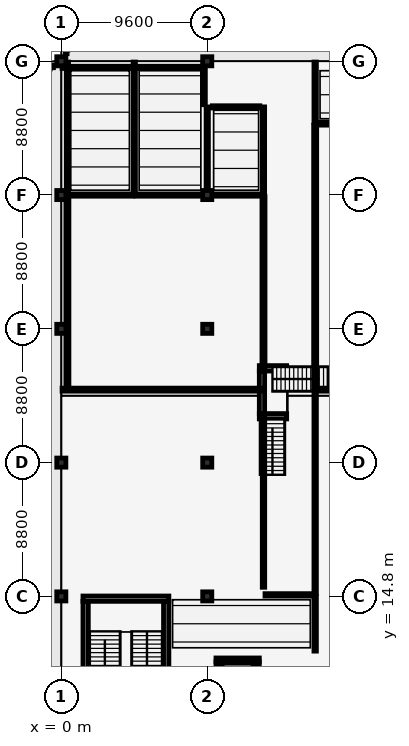
"""IFC4 building model, lengths in metres.
Left out: names, types, materials, properties, quantities, classifications, styles, units other than length and angle.
Written with IfcOpenShell. Run it as: python <this file> out.ifc"""

import sys

from ifc_helpers import new_model, si_unit, direction, frame, frame_2d, origin, origin_2d, place, context, subcontext, project, spatial, rectangle, extrude, element, fill, save


model = new_model("IFC4")
c1 = context("Model", 3, precision=1e-05, world=origin(), true_north=direction((0.0, 1.0)))
c2 = subcontext(c1, "Body", "Model", "MODEL_VIEW")
j1 = project(units=[si_unit("LENGTHUNIT", "METRE"), si_unit("PLANEANGLEUNIT", "RADIAN")], contexts=[c1])
p1 = place(None, origin())
s1 = spatial("IfcSite", under=j1, at=p1, CompositionType="ELEMENT")
p2 = place(p1, origin())
s2 = spatial("IfcBuilding", under=s1, at=p2, CompositionType="ELEMENT")
p3 = place(p2, origin())
s3 = spatial("IfcBuildingStorey", under=s2, at=p3, CompositionType="ELEMENT", Elevation=0.0)
for number, where, z_axis, x_axis in (
    (1, (0.0, 14.8, 0.0), (0.0, 0.0, 1.0), (1.0, 0.0, 0.0)),
    (2, (0.0, 23.6, 0.0), (0.0, 0.0, 1.0), (1.0, 0.0, 0.0)),
    (3, (0.0, 32.4, 0.0), (0.0, 0.0, 1.0), (1.0, 0.0, 0.0)),
    (4, (0.0, 41.2, 0.0), (0.0, 0.0, 1.0), (1.0, 0.0, 0.0)),
    (5, (0.0, 50.0, 0.0), (0.0, 0.0, 1.0), (1.0, 0.0, 0.0)),
    (6, (9.6, 14.8, 0.0), (0.0, 0.0, 1.0), (1.0, 0.0, 0.0)),
    (7, (9.6, 23.6, 0.0), (0.0, 0.0, 1.0), (1.0, 0.0, 0.0)),
    (8, (9.6, 32.4, 0.0), (0.0, 0.0, 1.0), (1.0, 0.0, 0.0)),
    (9, (9.6, 41.2, 0.0), (0.0, 0.0, 1.0), (1.0, 0.0, 0.0)),
    (10, (9.6, 50.0, 0.0), (0.0, 0.0, 1.0), (1.0, 0.0, 0.0)),
):
    element("IfcColumn", number, at=place(p3, frame(where, z_axis=z_axis, x_axis=x_axis)), inside=s3, PredefinedType="COLUMN", context=c2, shape_type="SweptSolid", body=[
        extrude(rectangle(XDim=0.6, YDim=0.6, at=origin_2d()), origin(), (0.0, 0.0, 1.0), 4.8),
    ])
p4 = place(p3, frame((1.425, 14.65, 0.0), z_axis=(0.0, 0.0, 1.0), x_axis=(1.0, 0.0, 0.0)))
e11 = element("IfcWall", 11, at=p4, inside=s3, PredefinedType="SHEAR", context=c2, shape_type="SweptSolid", body=[
    extrude(rectangle(XDim=5.65, YDim=0.35, at=frame_2d((2.825, 0.0))), origin(), (0.0, 0.0, 1.0), 4.55),
])
p5 = place(p3, frame((1.6, 6.525, 0.0), z_axis=(0.0, 0.0, 1.0), x_axis=(0.0, 1.0, 0.0)))
e12 = element("IfcWall", 12, at=p5, inside=s3, PredefinedType="SHEAR", context=c2, shape_type="SweptSolid", body=[
    extrude(rectangle(XDim=7.95, YDim=0.35, at=frame_2d((3.975, 0.0))), origin(), (0.0, 0.0, 1.0), 4.55),
])
p6 = place(p3, frame((6.9, 14.475, 0.0), z_axis=(0.0, 0.0, 1.0), x_axis=(0.0, -1.0, 0.0)))
e13 = element("IfcWall", 13, at=p6, inside=s3, PredefinedType="SHEAR", context=c2, shape_type="SweptSolid", body=[
    extrude(rectangle(XDim=7.95, YDim=0.35, at=frame_2d((3.975, 0.0))), origin(), (0.0, 0.0, 1.0), 4.55),
])
p7 = place(p6, frame((0.35, 0.0, 0.0)))
e14 = element("IfcOpeningElement", 14, at=p7, cuts=e13, PredefinedType="OPENING", context=c2, shape_type="SweptSolid", body=[
    extrude(rectangle(XDim=2.05, YDim=2.15, at=frame_2d((1.025, 1.075))), frame((0.0, 0.185, 0.0), z_axis=(0.0, -1.0, 0.0), x_axis=(1.0, 0.0, 0.0)), (0.0, 0.0, 1.0), 0.37),
])
for number, where, z_axis, x_axis in (
    (15, (13.025, 26.65, 0.0), (0.0, 0.0, 1.0), (1.0, 0.0, 0.0)),
    (16, (13.025, 29.8, 0.0), (0.0, 0.0, 1.0), (1.0, 0.0, 0.0)),
):
    element("IfcWall", number, at=place(p3, frame(where, z_axis=z_axis, x_axis=x_axis)), inside=s3, PredefinedType="SHEAR", context=c2, shape_type="SweptSolid", body=[
        extrude(rectangle(XDim=1.8, YDim=0.35, at=frame_2d((0.9, 0.0))), origin(), (0.0, 0.0, 1.0), 2.205),
    ])
p8 = place(p3, frame((13.2, 26.825, 0.0), z_axis=(0.0, 0.0, 1.0), x_axis=(0.0, 1.0, 0.0)))
e17 = element("IfcWall", 17, at=p8, inside=s3, PredefinedType="SHEAR", context=c2, shape_type="SweptSolid", body=[
    extrude(rectangle(XDim=2.8, YDim=0.35, at=frame_2d((1.4, 0.0))), origin(), (0.0, 0.0, 1.0), 2.205),
])
p9 = place(p3, frame((10.175, 10.625, -1.5), z_axis=(0.0, 0.0, 1.0), x_axis=(1.0, 0.0, 0.0)))
e18 = element("IfcWall", 18, at=p9, inside=s3, PredefinedType="SOLIDWALL", context=c2, shape_type="SweptSolid", body=[
    extrude(rectangle(XDim=2.85, YDim=0.25, at=frame_2d((1.425, 0.0))), origin(), (0.0, 0.0, 1.0), 6.05),
])
p10 = place(p9, frame((0.875, 0.0, 1.5)))
e19 = element("IfcOpeningElement", 19, at=p10, cuts=e18, PredefinedType="OPENING", context=c2, shape_type="SweptSolid", body=[
    extrude(rectangle(XDim=1.1, YDim=2.15, at=frame_2d((0.55, 1.075))), frame((0.0, 0.135, 0.0), z_axis=(0.0, -1.0, 0.0), x_axis=(1.0, 0.0, 0.0)), (0.0, 0.0, 1.0), 0.27),
])
for number, where, z_axis, x_axis in (
    (20, (10.3, 8.7, -1.5), (0.0, 0.0, 1.0), (0.0, 1.0, 0.0)),
    (21, (12.9, 10.5, -1.5), (0.0, 0.0, 1.0), (0.0, -1.0, 0.0)),
):
    element("IfcWall", number, at=place(p3, frame(where, z_axis=z_axis, x_axis=x_axis)), inside=s3, PredefinedType="SOLIDWALL", context=c2, shape_type="SweptSolid", body=[
        extrude(rectangle(XDim=1.8, YDim=0.25, at=frame_2d((0.9, 0.0))), origin(), (0.0, 0.0, 1.0), 6.05),
    ])
p11 = place(p3, frame((16.8, 28.4, 0.0), z_axis=(0.0, 0.0, 1.0), x_axis=(1.0, 0.0, 0.0)))
e22 = element("IfcWall", 22, at=p11, inside=s3, PredefinedType="PARTITIONING", context=c2, shape_type="SweptSolid", body=[
    extrude(rectangle(XDim=14.2, YDim=0.2, at=frame_2d((7.1, 0.0))), origin(), (0.0, 0.0, 1.0), 4.42),
])
p12 = place(p3, frame((16.7, 11.2, 0.0), z_axis=(0.0, 0.0, 1.0), x_axis=(0.0, 1.0, 0.0)))
e23 = element("IfcWall", 23, at=p12, inside=s3, PredefinedType="PARTITIONING", context=c2, shape_type="SweptSolid", body=[
    extrude(rectangle(XDim=3.6, YDim=0.16, at=frame_2d((1.8, 0.0))), origin(), (0.0, 0.0, 1.0), 4.42),
])
p13 = place(p12, frame((0.9, 0.0, 0.0)))
e24 = element("IfcOpeningElement", 24, at=p13, cuts=e23, PredefinedType="OPENING", context=c2, shape_type="SweptSolid", body=[
    extrude(rectangle(XDim=1.8, YDim=2.15, at=frame_2d((0.9, 1.075))), frame((0.0, 0.09, 0.0), z_axis=(0.0, -1.0, 0.0), x_axis=(1.0, 0.0, 0.0)), (0.0, 0.0, 1.0), 0.18),
])
p14 = place(p3, frame((16.7, 15.0, 0.0), z_axis=(0.0, 0.0, 1.0), x_axis=(0.0, 1.0, 0.0)))
e25 = element("IfcWall", 25, at=p14, inside=s3, PredefinedType="PARTITIONING", context=c2, shape_type="SweptSolid", body=[
    extrude(rectangle(XDim=13.3, YDim=0.16, at=frame_2d((6.65, 0.0))), origin(), (0.0, 0.0, 1.0), 4.42),
])
p15 = place(p14, frame((5.75, 0.0, 0.0)))
e26 = element("IfcOpeningElement", 26, at=p15, cuts=e25, PredefinedType="OPENING", context=c2, shape_type="SweptSolid", body=[
    extrude(rectangle(XDim=1.8, YDim=2.15, at=frame_2d((0.9, 1.075))), frame((0.0, 0.09, 0.0), z_axis=(0.0, -1.0, 0.0), x_axis=(1.0, 0.0, 0.0)), (0.0, 0.0, 1.0), 0.18),
])
p16 = place(p3, frame((0.05, 28.4, 0.0), z_axis=(0.0, 0.0, 1.0), x_axis=(1.0, 0.0, 0.0)))
e27 = element("IfcWall", 27, at=p16, inside=s3, PredefinedType="PARTITIONING", context=c2, shape_type="SweptSolid", body=[
    extrude(rectangle(XDim=13.15, YDim=0.2, at=frame_2d((6.575, 0.0))), origin(), (0.0, 0.0, 1.0), 4.42),
])
p17 = place(p3, frame((13.3, 15.4, 0.0), z_axis=(0.0, 0.0, 1.0), x_axis=(0.0, 1.0, 0.0)))
e28 = element("IfcWall", 28, at=p17, inside=s3, PredefinedType="PARTITIONING", context=c2, shape_type="SweptSolid", body=[
    extrude(rectangle(XDim=11.345, YDim=0.16, at=frame_2d((5.673, 0.0))), origin(), (0.0, 0.0, 1.0), 4.42),
])
p18 = place(p17, frame((4.772, 0.0, 0.0)))
e29 = element("IfcOpeningElement", 29, at=p18, cuts=e28, PredefinedType="OPENING", context=c2, shape_type="SweptSolid", body=[
    extrude(rectangle(XDim=1.8, YDim=2.15, at=frame_2d((0.9, 1.075))), frame((0.0, 0.09, 0.0), z_axis=(0.0, -1.0, 0.0), x_axis=(1.0, 0.0, 0.0)), (0.0, 0.0, 1.0), 0.18),
])
p19 = place(p3, frame((13.3, 29.705, 0.0), z_axis=(0.0, 0.0, 1.0), x_axis=(0.0, 1.0, 0.0)))
e30 = element("IfcWall", 30, at=p19, inside=s3, PredefinedType="PARTITIONING", context=c2, shape_type="SweptSolid", body=[
    extrude(rectangle(XDim=11.395, YDim=0.2, at=frame_2d((5.698, 0.0))), origin(), (0.0, 0.0, 1.0), 4.42),
])
p20 = place(p19, frame((4.898, 0.0, 0.0)))
e31 = element("IfcOpeningElement", 31, at=p20, cuts=e30, PredefinedType="OPENING", context=c2, shape_type="SweptSolid", body=[
    extrude(rectangle(XDim=1.6, YDim=2.15, at=frame_2d((0.8, 1.075))), frame((0.0, 0.11, 0.0), z_axis=(0.0, -1.0, 0.0), x_axis=(1.0, 0.0, 0.0)), (0.0, 0.0, 1.0), 0.22),
])
p21 = place(p3, frame((0.05, 41.2, 0.0), z_axis=(0.0, 0.0, 1.0), x_axis=(1.0, 0.0, 0.0)))
e32 = element("IfcWall", 32, at=p21, inside=s3, PredefinedType="PARTITIONING", context=c2, shape_type="SweptSolid", body=[
    extrude(rectangle(XDim=4.65, YDim=0.15, at=frame_2d((2.325, 0.0))), origin(), (0.0, 0.0, 1.0), 3.895),
])
p22 = place(p3, frame((4.9, 41.2, 0.0), z_axis=(0.0, 0.0, 1.0), x_axis=(1.0, 0.0, 0.0)))
e33 = element("IfcWall", 33, at=p22, inside=s3, PredefinedType="PARTITIONING", context=c2, shape_type="SweptSolid", body=[
    extrude(rectangle(XDim=4.5, YDim=0.15, at=frame_2d((2.25, 0.0))), origin(), (0.0, 0.0, 1.0), 3.895),
])
p23 = place(p3, frame((9.8, 41.2, 0.0), z_axis=(0.0, 0.0, 1.0), x_axis=(1.0, 0.0, 0.0)))
e34 = element("IfcWall", 34, at=p23, inside=s3, PredefinedType="PARTITIONING", context=c2, shape_type="SweptSolid", body=[
    extrude(rectangle(XDim=3.4, YDim=0.15, at=frame_2d((1.7, 0.0))), origin(), (0.0, 0.0, 1.0), 3.895),
])
p24 = place(p3, frame((16.7, 28.5, 0.0), z_axis=(0.0, 0.0, 1.0), x_axis=(0.0, 1.0, 0.0)))
e35 = element("IfcWall", 35, at=p24, inside=s3, PredefinedType="PARTITIONING", context=c2, shape_type="SweptSolid", body=[
    extrude(rectangle(XDim=17.3, YDim=0.2, at=frame_2d((8.65, 0.0))), origin(), (0.0, 0.0, 1.0), 4.42),
])
p25 = place(p24, frame((7.85, 0.0, 0.0)))
e36 = element("IfcOpeningElement", 36, at=p25, cuts=e35, PredefinedType="OPENING", context=c2, shape_type="SweptSolid", body=[
    extrude(rectangle(XDim=1.6, YDim=2.15, at=frame_2d((0.8, 1.075))), frame((0.0, 0.11, 0.0), z_axis=(0.0, -1.0, 0.0), x_axis=(1.0, 0.0, 0.0)), (0.0, 0.0, 1.0), 0.22),
])
p26 = place(p3, frame((16.8, 45.9, 0.0), z_axis=(0.0, 0.0, 1.0), x_axis=(1.0, 0.0, 0.0)))
e37 = element("IfcWall", 37, at=p26, inside=s3, PredefinedType="PARTITIONING", context=c2, shape_type="SweptSolid", body=[
    extrude(rectangle(XDim=14.2, YDim=0.2, at=frame_2d((7.1, 0.0))), origin(), (0.0, 0.0, 1.0), 4.42),
])
p27 = place(p26, frame((6.3, 0.0, 0.0)))
e38 = element("IfcOpeningElement", 38, at=p27, cuts=e37, PredefinedType="OPENING", context=c2, shape_type="SweptSolid", body=[
    extrude(rectangle(XDim=1.6, YDim=2.15, at=frame_2d((0.8, 1.075))), frame((0.0, 0.11, 0.0), z_axis=(0.0, -1.0, 0.0), x_axis=(1.0, 0.0, 0.0)), (0.0, 0.0, 1.0), 0.22),
])
p28 = place(p3, frame((13.4, 14.9, 0.0), z_axis=(0.0, 0.0, 1.0), x_axis=(1.0, 0.0, 0.0)))
e39 = element("IfcWall", 39, at=p28, inside=s3, PredefinedType="PARTITIONING", context=c2, shape_type="SweptSolid", body=[
    extrude(rectangle(XDim=3.2, YDim=0.16, at=frame_2d((1.6, 0.0))), origin(), (0.0, 0.0, 1.0), 3.895),
])
p29 = place(p28, frame((0.7, 0.0, 0.0)))
e40 = element("IfcOpeningElement", 40, at=p29, cuts=e39, PredefinedType="OPENING", context=c2, shape_type="SweptSolid", body=[
    extrude(rectangle(XDim=1.8, YDim=2.15, at=frame_2d((0.9, 1.075))), frame((0.0, 0.09, 0.0), z_axis=(0.0, -1.0, 0.0), x_axis=(1.0, 0.0, 0.0)), (0.0, 0.0, 1.0), 0.18),
])
p30 = place(p3, frame((16.7, 46.0, 0.0), z_axis=(0.0, 0.0, 1.0), x_axis=(0.0, 1.0, 0.0)))
e41 = element("IfcWall", 41, at=p30, inside=s3, PredefinedType="PARTITIONING", context=c2, shape_type="SweptSolid", body=[
    extrude(rectangle(XDim=3.95, YDim=0.16, at=frame_2d((1.975, 0.0))), origin(), (0.0, 0.0, 1.0), 4.42),
])
p31 = place(p30, frame((1.075, 0.0, 0.0)))
e42 = element("IfcOpeningElement", 42, at=p31, cuts=e41, PredefinedType="OPENING", context=c2, shape_type="SweptSolid", body=[
    extrude(rectangle(XDim=1.8, YDim=2.15, at=frame_2d((0.9, 1.075))), frame((0.0, 0.09, 0.0), z_axis=(0.0, -1.0, 0.0), x_axis=(1.0, 0.0, 0.0)), (0.0, 0.0, 1.0), 0.18),
])
p32 = place(p3, frame((13.3, 41.3, 0.0), z_axis=(0.0, 0.0, 1.0), x_axis=(0.0, 1.0, 0.0)))
e43 = element("IfcWall", 43, at=p32, inside=s3, PredefinedType="PARTITIONING", context=c2, shape_type="SweptSolid", body=[
    extrude(rectangle(XDim=5.7, YDim=0.15, at=frame_2d((2.85, 0.0))), origin(), (0.0, 0.0, 1.0), 4.42),
])
p33 = place(p32, frame((2.375, 0.0, 0.0)))
e44 = element("IfcOpeningElement", 44, at=p33, cuts=e43, PredefinedType="OPENING", context=c2, shape_type="SweptSolid", body=[
    extrude(rectangle(XDim=0.95, YDim=2.15, at=frame_2d((0.475, 1.075))), frame((0.0, 0.085, 0.0), z_axis=(0.0, -1.0, 0.0), x_axis=(1.0, 0.0, 0.0)), (0.0, 0.0, 1.0), 0.17),
])
p34 = place(p3, frame((4.8, 41.3, 0.0), z_axis=(0.0, 0.0, 1.0), x_axis=(0.0, 1.0, 0.0)))
e45 = element("IfcWall", 45, at=p34, inside=s3, PredefinedType="PARTITIONING", context=c2, shape_type="SweptSolid", body=[
    extrude(rectangle(XDim=8.65, YDim=0.15, at=frame_2d((4.325, 0.0))), origin(), (0.0, 0.0, 1.0), 4.42),
])
p35 = place(p3, frame((9.6, 41.3, 0.0), z_axis=(0.0, 0.0, 1.0), x_axis=(0.0, 1.0, 0.0)))
e46 = element("IfcWall", 46, at=p35, inside=s3, PredefinedType="PARTITIONING", context=c2, shape_type="SweptSolid", body=[
    extrude(rectangle(XDim=5.7, YDim=0.15, at=frame_2d((2.85, 0.0))), origin(), (0.0, 0.0, 1.0), 4.037),
])
p36 = place(p3, frame((0.4, 28.64, 0.0), z_axis=(0.0, 0.0, 1.0), x_axis=(0.0, 1.0, 0.0)))
e47 = element("IfcWall", 47, at=p36, inside=s3, PredefinedType="PARTITIONING", context=c2, shape_type="SweptSolid", body=[
    extrude(rectangle(XDim=12.32, YDim=0.2, at=frame_2d((6.16, 0.0))), origin(), (0.0, 0.0, 1.0), 4.42),
])
p37 = place(p3, frame((0.05, 49.6, 0.0), z_axis=(0.0, 0.0, 1.0), x_axis=(1.0, 0.0, 0.0)))
e48 = element("IfcWall", 48, at=p37, inside=s3, PredefinedType="PARTITIONING", context=c2, shape_type="SweptSolid", body=[
    extrude(rectangle(XDim=4.51, YDim=0.15, at=frame_2d((2.255, 0.0))), origin(), (0.0, 0.0, 1.0), 4.42),
])
p38 = place(p37, frame((1.805, 0.0, 0.0)))
e49 = element("IfcOpeningElement", 49, at=p38, cuts=e48, PredefinedType="OPENING", context=c2, shape_type="SweptSolid", body=[
    extrude(rectangle(XDim=0.9, YDim=2.15, at=frame_2d((0.45, 1.075))), frame((0.0, 0.085, 0.0), z_axis=(0.0, -1.0, 0.0), x_axis=(1.0, 0.0, 0.0)), (0.0, 0.0, 1.0), 0.17),
])
p39 = place(p3, frame((0.4, 41.44, 0.0), z_axis=(0.0, 0.0, 1.0), x_axis=(0.0, 1.0, 0.0)))
e50 = element("IfcWall", 50, at=p39, inside=s3, PredefinedType="PARTITIONING", context=c2, shape_type="SweptSolid", body=[
    extrude(rectangle(XDim=8.51, YDim=0.15, at=frame_2d((4.255, 0.0))), origin(), (0.0, 0.0, 1.0), 4.42),
])
p40 = place(p3, frame((5.04, 49.6, 0.0), z_axis=(0.0, 0.0, 1.0), x_axis=(1.0, 0.0, 0.0)))
e51 = element("IfcWall", 51, at=p40, inside=s3, PredefinedType="PARTITIONING", context=c2, shape_type="SweptSolid", body=[
    extrude(rectangle(XDim=4.22, YDim=0.15, at=frame_2d((2.11, 0.0))), origin(), (0.0, 0.0, 1.0), 4.42),
])
p41 = place(p40, frame((1.66, 0.0, 0.0)))
e52 = element("IfcOpeningElement", 52, at=p41, cuts=e51, PredefinedType="OPENING", context=c2, shape_type="SweptSolid", body=[
    extrude(rectangle(XDim=0.9, YDim=2.15, at=frame_2d((0.45, 1.075))), frame((0.0, 0.085, 0.0), z_axis=(0.0, -1.0, 0.0), x_axis=(1.0, 0.0, 0.0)), (0.0, 0.0, 1.0), 0.17),
])
p42 = place(p3, frame((9.4, 47.14, 0.0), z_axis=(0.0, 0.0, 1.0), x_axis=(0.0, 1.0, 0.0)))
e53 = element("IfcWall", 53, at=p42, inside=s3, PredefinedType="PARTITIONING", context=c2, shape_type="SweptSolid", body=[
    extrude(rectangle(XDim=2.81, YDim=0.15, at=frame_2d((1.405, 0.0))), origin(), (0.0, 0.0, 1.0), 4.037),
])
p43 = place(p3, frame((9.94, 47.0, 0.0), z_axis=(0.0, 0.0, 1.0), x_axis=(1.0, 0.0, 0.0)))
e54 = element("IfcWall", 54, at=p43, inside=s3, PredefinedType="PARTITIONING", context=c2, shape_type="SweptSolid", body=[
    extrude(rectangle(XDim=3.12, YDim=0.15, at=frame_2d((1.56, 0.0))), origin(), (0.0, 0.0, 1.0), 4.1),
])
p44 = place(p7, origin())
e55 = element("IfcDoor", 55, at=p44, inside=s3, OperationType="DOUBLE_DOOR_SINGLE_SWING", PredefinedType="DOOR", context=c2, shape_type="SweptSolid", body=[
    extrude(rectangle(XDim=2.05, YDim=2.15, at=frame_2d((1.025, 1.075))), frame((0.0, 0.025, 0.0), z_axis=(0.0, -1.0, 0.0), x_axis=(1.0, 0.0, 0.0)), (0.0, 0.0, 1.0), 0.05),
])
fill(e14, e55)
p45 = place(p10, origin())
e56 = element("IfcDoor", 56, at=p45, inside=s3, OperationType="DOUBLE_DOOR_SLIDING", PredefinedType="DOOR", context=c2, shape_type="SweptSolid", body=[
    extrude(rectangle(XDim=1.1, YDim=2.15, at=frame_2d((0.55, 1.075))), frame((0.0, 0.025, 0.0), z_axis=(0.0, -1.0, 0.0), x_axis=(1.0, 0.0, 0.0)), (0.0, 0.0, 1.0), 0.05),
])
fill(e19, e56)
p46 = place(p13, origin())
e57 = element("IfcDoor", 57, at=p46, inside=s3, OperationType="DOUBLE_DOOR_SINGLE_SWING", PredefinedType="DOOR", context=c2, shape_type="SweptSolid", body=[
    extrude(rectangle(XDim=1.8, YDim=2.15, at=frame_2d((0.9, 1.075))), frame((0.0, 0.025, 0.0), z_axis=(0.0, -1.0, 0.0), x_axis=(1.0, 0.0, 0.0)), (0.0, 0.0, 1.0), 0.05),
])
fill(e24, e57)
p47 = place(p15, origin())
e58 = element("IfcDoor", 58, at=p47, inside=s3, OperationType="DOUBLE_DOOR_SINGLE_SWING", PredefinedType="DOOR", context=c2, shape_type="SweptSolid", body=[
    extrude(rectangle(XDim=1.8, YDim=2.15, at=frame_2d((0.9, 1.075))), frame((0.0, 0.025, 0.0), z_axis=(0.0, -1.0, 0.0), x_axis=(1.0, 0.0, 0.0)), (0.0, 0.0, 1.0), 0.05),
])
fill(e26, e58)
p48 = place(p18, origin())
e59 = element("IfcDoor", 59, at=p48, inside=s3, OperationType="DOUBLE_DOOR_SINGLE_SWING", PredefinedType="DOOR", context=c2, shape_type="SweptSolid", body=[
    extrude(rectangle(XDim=1.8, YDim=2.15, at=frame_2d((0.9, 1.075))), frame((0.0, 0.025, 0.0), z_axis=(0.0, -1.0, 0.0), x_axis=(1.0, 0.0, 0.0)), (0.0, 0.0, 1.0), 0.05),
])
fill(e29, e59)
p49 = place(p20, origin())
e60 = element("IfcDoor", 60, at=p49, inside=s3, OperationType="DOUBLE_DOOR_SINGLE_SWING", PredefinedType="DOOR", context=c2, shape_type="SweptSolid", body=[
    extrude(rectangle(XDim=1.6, YDim=2.15, at=frame_2d((0.8, 1.075))), frame((0.0, 0.025, 0.0), z_axis=(0.0, -1.0, 0.0), x_axis=(1.0, 0.0, 0.0)), (0.0, 0.0, 1.0), 0.05),
])
fill(e31, e60)
p50 = place(p25, origin())
e61 = element("IfcDoor", 61, at=p50, inside=s3, OperationType="DOUBLE_DOOR_SINGLE_SWING", PredefinedType="DOOR", context=c2, shape_type="SweptSolid", body=[
    extrude(rectangle(XDim=1.6, YDim=2.15, at=frame_2d((0.8, 1.075))), frame((0.0, 0.025, 0.0), z_axis=(0.0, -1.0, 0.0), x_axis=(1.0, 0.0, 0.0)), (0.0, 0.0, 1.0), 0.05),
])
fill(e36, e61)
p51 = place(p29, origin())
e62 = element("IfcDoor", 62, at=p51, inside=s3, OperationType="DOUBLE_DOOR_SINGLE_SWING", PredefinedType="DOOR", context=c2, shape_type="SweptSolid", body=[
    extrude(rectangle(XDim=1.8, YDim=2.15, at=frame_2d((0.9, 1.075))), frame((0.0, 0.025, 0.0), z_axis=(0.0, -1.0, 0.0), x_axis=(1.0, 0.0, 0.0)), (0.0, 0.0, 1.0), 0.05),
])
fill(e40, e62)
p52 = place(p31, origin())
e63 = element("IfcDoor", 63, at=p52, inside=s3, OperationType="DOUBLE_DOOR_SINGLE_SWING", PredefinedType="DOOR", context=c2, shape_type="SweptSolid", body=[
    extrude(rectangle(XDim=1.8, YDim=2.15, at=frame_2d((0.9, 1.075))), frame((0.0, 0.025, 0.0), z_axis=(0.0, -1.0, 0.0), x_axis=(1.0, 0.0, 0.0)), (0.0, 0.0, 1.0), 0.05),
])
fill(e42, e63)
p53 = place(p33, origin())
e64 = element("IfcDoor", 64, at=p53, inside=s3, OperationType="SINGLE_SWING_LEFT", PredefinedType="DOOR", context=c2, shape_type="SweptSolid", body=[
    extrude(rectangle(XDim=0.95, YDim=2.15, at=frame_2d((0.475, 1.075))), frame((0.0, 0.025, 0.0), z_axis=(0.0, -1.0, 0.0), x_axis=(1.0, 0.0, 0.0)), (0.0, 0.0, 1.0), 0.05),
])
fill(e44, e64)
p54 = place(p38, origin())
e65 = element("IfcDoor", 65, at=p54, inside=s3, OperationType="SINGLE_SWING_LEFT", PredefinedType="DOOR", context=c2, shape_type="SweptSolid", body=[
    extrude(rectangle(XDim=0.9, YDim=2.15, at=frame_2d((0.45, 1.075))), frame((0.0, 0.025, 0.0), z_axis=(0.0, -1.0, 0.0), x_axis=(1.0, 0.0, 0.0)), (0.0, 0.0, 1.0), 0.05),
])
fill(e49, e65)
p55 = place(p41, origin())
e66 = element("IfcDoor", 66, at=p55, inside=s3, OperationType="SINGLE_SWING_RIGHT", PredefinedType="DOOR", context=c2, shape_type="SweptSolid", body=[
    extrude(rectangle(XDim=0.9, YDim=2.15, at=frame_2d((0.45, 1.075))), frame((0.0, 0.025, 0.0), z_axis=(0.0, -1.0, 0.0), x_axis=(1.0, 0.0, 0.0)), (0.0, 0.0, 1.0), 0.05),
])
fill(e52, e66)
save(model, sys.argv[1])
